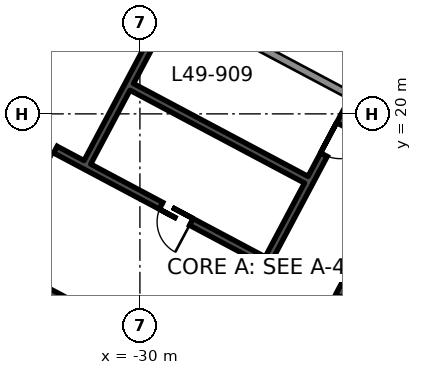
"""IFC4 building model, lengths in metres.
Left out: names, types, materials, properties, quantities, classifications, styles, units other than length and angle.
Written with IfcOpenShell. Run it as: python <this file> out.ifc"""

import sys

from ifc_helpers import new_model, si_unit, direction, frame, frame_2d, origin, place, context, subcontext, project, spatial, rectangle, extrude, element, fill, save


model = new_model("IFC4")
c1 = context("Model", 3, precision=1e-05, world=origin(), true_north=direction((0.0, 1.0)))
c2 = subcontext(c1, "Body", "Model", "MODEL_VIEW")
j1 = project(units=[si_unit("LENGTHUNIT", "METRE"), si_unit("PLANEANGLEUNIT", "RADIAN")], contexts=[c1])
p1 = place(None, origin())
s1 = spatial("IfcSite", under=j1, at=p1, CompositionType="ELEMENT")
p2 = place(p1, origin())
s2 = spatial("IfcBuilding", under=s1, at=p2, CompositionType="ELEMENT")
p3 = place(p2, frame((0.0, 0.0, 224.7)))
s3 = spatial("IfcBuildingStorey", under=s2, at=p3, CompositionType="ELEMENT", Elevation=224.7)
p4 = place(p3, frame((-32.0, 28.001, 0.0), z_axis=(0.0, 0.0, 1.0), x_axis=(-0.469468958625, -0.882948977511, 0.0)))
e1 = element("IfcWall", 1, at=p4, inside=s3, PredefinedType="SHEAR", context=c2, shape_type="SweptSolid", body=[
    extrude(rectangle(XDim=19.4, YDim=0.6, at=frame_2d((9.7, 0.0))), origin(), (0.0, 0.0, 1.0), 3.9),
])
p5 = place(p4, frame((10.3, 0.0, 0.0)))
e2 = element("IfcOpeningElement", 2, at=p5, cuts=e1, PredefinedType="OPENING", context=c2, shape_type="SweptSolid", body=[
    extrude(rectangle(XDim=2.4, YDim=2.4, at=frame_2d((1.2, 1.2))), frame((0.0, 0.31, 0.0), z_axis=(0.0, -1.0, 0.0), x_axis=(1.0, 0.0, 0.0)), (0.0, 0.0, 1.0), 0.62),
])
p6 = place(p3, frame((-14.041, 18.112, 0.0), z_axis=(0.0, 0.0, 1.0), x_axis=(-0.882947755831, 0.46947125628, 0.0)))
e3 = element("IfcWall", 3, at=p6, inside=s3, PredefinedType="SHEAR", context=c2, shape_type="SweptSolid", body=[
    extrude(rectangle(XDim=20.2, YDim=0.6, at=frame_2d((10.1, 0.0))), origin(), (0.0, 0.0, 1.0), 3.9),
])
p7 = place(p3, frame((-21.333, 21.649, 0.0), z_axis=(0.0, 0.0, 1.0), x_axis=(-0.469494272526, -0.882935517501, 0.0)))
e4 = element("IfcWall", 4, at=p7, inside=s3, PredefinedType="SHEAR", context=c2, shape_type="SweptSolid", body=[
    extrude(rectangle(XDim=7.3, YDim=0.2, at=frame_2d((3.65, 0.0))), origin(), (0.0, 0.0, 1.0), 3.9),
])
p8 = place(p7, frame((1.3, 0.0, 0.0)))
e5 = element("IfcOpeningElement", 5, at=p8, cuts=e4, PredefinedType="OPENING", context=c2, shape_type="SweptSolid", body=[
    extrude(rectangle(XDim=1.2, YDim=2.1, at=frame_2d((0.6, 1.05))), frame((0.0, 0.11, 0.0), z_axis=(0.0, -1.0, 0.0), x_axis=(1.0, 0.0, 0.0)), (0.0, 0.0, 1.0), 0.22),
])
p9 = place(p3, frame((-23.188, 22.635, 0.0), z_axis=(0.0, 0.0, 1.0), x_axis=(-0.469454336211, -0.882956752176, 0.0)))
e6 = element("IfcWall", 6, at=p9, inside=s3, PredefinedType="SHEAR", context=c2, shape_type="SweptSolid", body=[
    extrude(rectangle(XDim=7.3, YDim=0.2, at=frame_2d((3.65, 0.0))), origin(), (0.0, 0.0, 1.0), 3.9),
])
p10 = place(p9, frame((0.8, 0.0, 0.0)))
e7 = element("IfcOpeningElement", 7, at=p10, cuts=e6, PredefinedType="OPENING", context=c2, shape_type="SweptSolid", body=[
    extrude(rectangle(XDim=0.9, YDim=2.1, at=frame_2d((0.45, 1.05))), frame((0.0, 0.11, 0.0), z_axis=(0.0, -1.0, 0.0), x_axis=(1.0, 0.0, 0.0)), (0.0, 0.0, 1.0), 0.22),
])
p11 = place(p9, frame((3.3, 0.0, 0.0)))
e8 = element("IfcOpeningElement", 8, at=p11, cuts=e6, PredefinedType="OPENING", context=c2, shape_type="SweptSolid", body=[
    extrude(rectangle(XDim=0.9, YDim=2.1, at=frame_2d((0.45, 1.05))), frame((0.0, 0.11, 0.0), z_axis=(0.0, -1.0, 0.0), x_axis=(1.0, 0.0, 0.0)), (0.0, 0.0, 1.0), 0.22),
])
p12 = place(p3, frame((-27.955, 25.171, 0.0), z_axis=(0.0, 0.0, 1.0), x_axis=(-0.469480409012, -0.88294288918, 0.0)))
e9 = element("IfcWall", 9, at=p12, inside=s3, PredefinedType="SHEAR", context=c2, shape_type="SweptSolid", body=[
    extrude(rectangle(XDim=7.3, YDim=0.2, at=frame_2d((3.65, 0.0))), origin(), (0.0, 0.0, 1.0), 3.9),
])
p13 = place(p3, frame((-24.449, 20.475, 0.0), z_axis=(0.0, 0.0, 1.0), x_axis=(-0.882934506056, 0.469496174655, 0.0)))
e10 = element("IfcWall", 10, at=p13, inside=s3, PredefinedType="SOLIDWALL", context=c2, shape_type="SweptSolid", body=[
    extrude(rectangle(XDim=5.2, YDim=0.2, at=frame_2d((2.6, 0.0))), origin(), (0.0, 0.0, 1.0), 3.9),
])
p14 = place(p3, frame((-25.623, 18.268, 0.0), z_axis=(0.0, 0.0, 1.0), x_axis=(-0.882953967957, 0.469459572775, 0.0)))
e11 = element("IfcWall", 11, at=p14, inside=s3, PredefinedType="SHEAR", context=c2, shape_type="SweptSolid", body=[
    extrude(rectangle(XDim=5.2, YDim=0.2, at=frame_2d((2.6, 0.0))), origin(), (0.0, 0.0, 1.0), 3.9),
])
p15 = place(p3, frame((-26.662, 16.102, 0.0), z_axis=(0.0, 0.0, 1.0), x_axis=(-0.882940221191, 0.469485426614, 0.0)))
e12 = element("IfcWall", 12, at=p15, inside=s3, PredefinedType="SHEAR", context=c2, shape_type="SweptSolid", body=[
    extrude(rectangle(XDim=10.0, YDim=0.2, at=frame_2d((5.0, 0.0))), origin(), (0.0, 0.0, 1.0), 3.9),
])
p16 = place(p15, frame((6.3, 0.0, 0.0)))
e13 = element("IfcOpeningElement", 13, at=p16, cuts=e12, PredefinedType="OPENING", context=c2, shape_type="SweptSolid", body=[
    extrude(rectangle(XDim=1.2, YDim=2.1, at=frame_2d((0.6, 1.05))), frame((0.0, 0.11, 0.0), z_axis=(0.0, -1.0, 0.0), x_axis=(1.0, 0.0, 0.0)), (0.0, 0.0, 1.0), 0.22),
])
p17 = place(p15, frame((2.25, 0.0, 0.0)))
e14 = element("IfcOpeningElement", 14, at=p17, cuts=e12, PredefinedType="OPENING", context=c2, shape_type="SweptSolid", body=[
    extrude(rectangle(XDim=0.9, YDim=2.1, at=frame_2d((0.45, 1.05))), frame((0.0, 0.11, 0.0), z_axis=(0.0, -1.0, 0.0), x_axis=(1.0, 0.0, 0.0)), (0.0, 0.0, 1.0), 0.22),
])
p18 = place(p3, frame((-29.935, 13.991, 0.0), z_axis=(0.0, 0.0, 1.0), x_axis=(-0.882952937579, 0.469461510692, 0.0)))
e15 = element("IfcWall", 15, at=p18, inside=s3, PredefinedType="SHEAR", context=c2, shape_type="SweptSolid", body=[
    extrude(rectangle(XDim=5.4, YDim=0.2, at=frame_2d((2.7, 0.0))), origin(), (0.0, 0.0, 1.0), 3.9),
])
p19 = place(p18, frame((0.8, 0.0, 0.0)))
e16 = element("IfcOpeningElement", 16, at=p19, cuts=e15, PredefinedType="OPENING", context=c2, shape_type="SweptSolid", body=[
    extrude(rectangle(XDim=1.1, YDim=2.1, at=frame_2d((0.55, 1.05))), frame((0.0, 0.11, 0.0), z_axis=(0.0, -1.0, 0.0), x_axis=(1.0, 0.0, 0.0)), (0.0, 0.0, 1.0), 0.22),
])
p20 = place(p18, frame((3.5, 0.0, 0.0)))
e17 = element("IfcOpeningElement", 17, at=p20, cuts=e15, PredefinedType="OPENING", context=c2, shape_type="SweptSolid", body=[
    extrude(rectangle(XDim=1.1, YDim=2.1, at=frame_2d((0.55, 1.05))), frame((0.0, 0.11, 0.0), z_axis=(0.0, -1.0, 0.0), x_axis=(1.0, 0.0, 0.0)), (0.0, 0.0, 1.0), 0.22),
])
p21 = place(p3, frame((-31.15, 11.919, 0.0), z_axis=(0.0, 0.0, 1.0), x_axis=(-0.882940221191, 0.469485426614, 0.0)))
e18 = element("IfcWall", 18, at=p21, inside=s3, PredefinedType="SHEAR", context=c2, shape_type="SweptSolid", body=[
    extrude(rectangle(XDim=8.0, YDim=0.2, at=frame_2d((4.0, 0.0))), origin(), (0.0, 0.0, 1.0), 3.9),
])
p22 = place(p3, frame((-48.812, 39.771, 0.0), z_axis=(0.0, 0.0, 1.0), x_axis=(0.882945384259, -0.469475716535, 0.0)))
e19 = element("IfcWall", 19, at=p22, inside=s3, PredefinedType="PARTITIONING", context=c2, shape_type="SweptSolid", body=[
    extrude(rectangle(XDim=55.283, YDim=0.15, at=frame_2d((27.642, 0.0))), origin(), (0.0, 0.0, 1.0), 3.54),
])
p23 = place(p22, frame((39.55, 0.0, 0.0)))
e20 = element("IfcOpeningElement", 20, at=p23, cuts=e19, PredefinedType="OPENING", context=c2, shape_type="SweptSolid", body=[
    extrude(rectangle(XDim=1.0, YDim=2.1, at=frame_2d((0.5, 1.05))), frame((0.0, 0.085, 0.0), z_axis=(0.0, -1.0, 0.0), x_axis=(1.0, 0.0, 0.0)), (0.0, 0.0, 1.0), 0.17),
])
p24 = place(p22, frame((27.15, 0.0, 0.0)))
e21 = element("IfcOpeningElement", 21, at=p24, cuts=e19, PredefinedType="OPENING", context=c2, shape_type="SweptSolid", body=[
    extrude(rectangle(XDim=1.0, YDim=2.1, at=frame_2d((0.5, 1.05))), frame((0.0, 0.085, 0.0), z_axis=(0.0, -1.0, 0.0), x_axis=(1.0, 0.0, 0.0)), (0.0, 0.0, 1.0), 0.17),
])
p25 = place(p22, frame((21.25, 0.0, 0.0)))
e22 = element("IfcOpeningElement", 22, at=p25, cuts=e19, PredefinedType="OPENING", context=c2, shape_type="SweptSolid", body=[
    extrude(rectangle(XDim=1.0, YDim=2.1, at=frame_2d((0.5, 1.05))), frame((0.0, 0.085, 0.0), z_axis=(0.0, -1.0, 0.0), x_axis=(1.0, 0.0, 0.0)), (0.0, 0.0, 1.0), 0.17),
])
p26 = place(p22, frame((15.55, 0.0, 0.0)))
e23 = element("IfcOpeningElement", 23, at=p26, cuts=e19, PredefinedType="OPENING", context=c2, shape_type="SweptSolid", body=[
    extrude(rectangle(XDim=1.0, YDim=2.1, at=frame_2d((0.5, 1.05))), frame((0.0, 0.085, 0.0), z_axis=(0.0, -1.0, 0.0), x_axis=(1.0, 0.0, 0.0)), (0.0, 0.0, 1.0), 0.17),
])
p27 = place(p16, origin())
e24 = element("IfcDoor", 24, at=p27, inside=s3, OperationType="SINGLE_SWING_LEFT", PredefinedType="DOOR", context=c2, shape_type="SweptSolid", body=[
    extrude(rectangle(XDim=1.2, YDim=2.1, at=frame_2d((0.6, 1.05))), frame((0.0, 0.025, 0.0), z_axis=(0.0, -1.0, 0.0), x_axis=(1.0, 0.0, 0.0)), (0.0, 0.0, 1.0), 0.05),
])
fill(e13, e24)
p28 = place(p17, origin())
e25 = element("IfcDoor", 25, at=p28, inside=s3, OperationType="SINGLE_SWING_LEFT", PredefinedType="DOOR", context=c2, shape_type="SweptSolid", body=[
    extrude(rectangle(XDim=0.9, YDim=2.1, at=frame_2d((0.45, 1.05))), frame((0.0, 0.025, 0.0), z_axis=(0.0, -1.0, 0.0), x_axis=(1.0, 0.0, 0.0)), (0.0, 0.0, 1.0), 0.05),
])
fill(e14, e25)
p29 = place(p11, origin())
e26 = element("IfcDoor", 26, at=p29, inside=s3, OperationType="SINGLE_SWING_LEFT", PredefinedType="DOOR", context=c2, shape_type="SweptSolid", body=[
    extrude(rectangle(XDim=0.9, YDim=2.1, at=frame_2d((0.45, 1.05))), frame((0.0, 0.025, 0.0), z_axis=(0.0, -1.0, 0.0), x_axis=(1.0, 0.0, 0.0)), (0.0, 0.0, 1.0), 0.05),
])
fill(e8, e26)
save(model, sys.argv[1])
